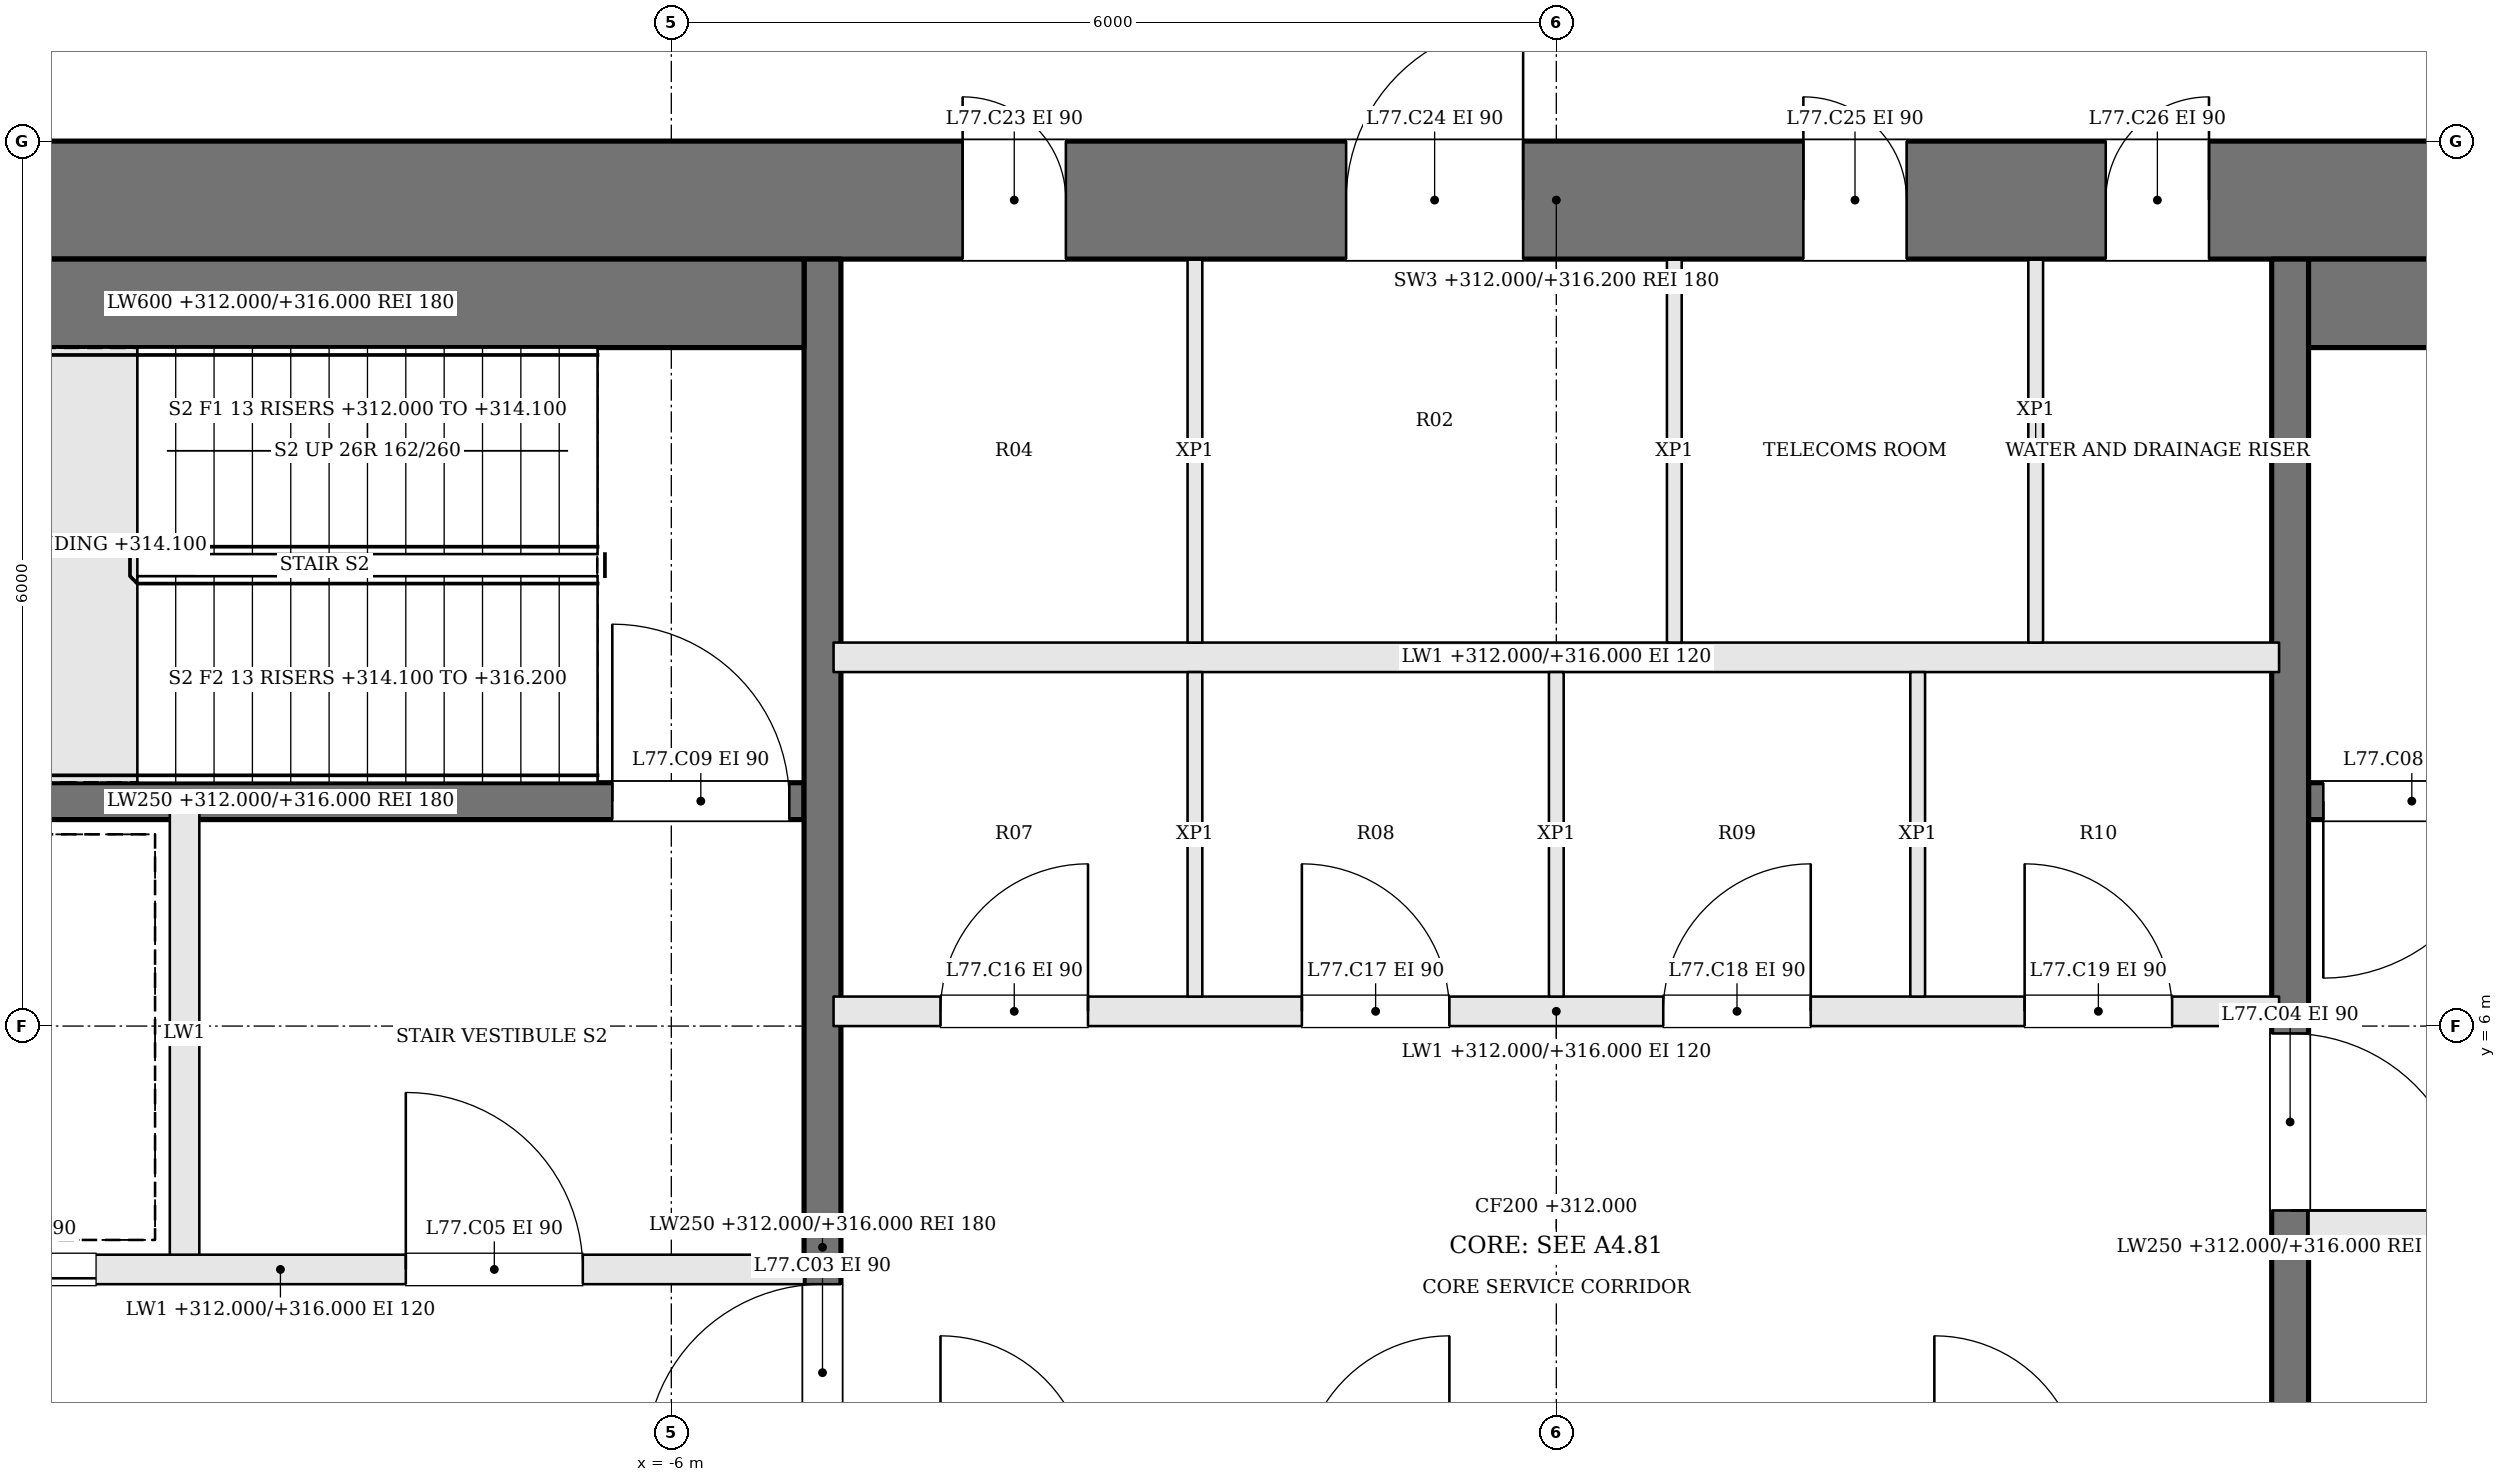
"""IFC4 building model, lengths in metres.
Left out: names, types, materials, properties, quantities, classifications, styles, units other than length and angle.
Written with IfcOpenShell. Run it as: python <this file> out.ifc"""

import sys

from ifc_helpers import new_model, si_unit, direction, frame, frame_2d, origin, place, context, subcontext, project, spatial, rectangle, extrude, element, fill, save


model = new_model("IFC4")
c1 = context("Model", 3, precision=1e-05, world=origin(), true_north=direction((0.0, 1.0)))
c2 = subcontext(c1, "Body", "Model", "MODEL_VIEW")
j1 = project(units=[si_unit("LENGTHUNIT", "METRE"), si_unit("PLANEANGLEUNIT", "RADIAN")], contexts=[c1])
p1 = place(None, origin())
s1 = spatial("IfcSite", under=j1, at=p1, CompositionType="ELEMENT")
p2 = place(p1, origin())
s2 = spatial("IfcBuilding", under=s1, at=p2, CompositionType="ELEMENT")
p3 = place(p2, frame((0.0, 0.0, 312.0)))
s3 = spatial("IfcBuildingStorey", under=s2, at=p3, CompositionType="ELEMENT", Elevation=312.0)
p4 = place(p3, frame((-13.0, 11.6, 0.0), z_axis=(0.0, 0.0, 1.0), x_axis=(1.0, 0.0, 0.0)))
e1 = element("IfcWall", 1, at=p4, inside=s3, PredefinedType="SHEAR", context=c2, shape_type="SweptSolid", body=[
    extrude(rectangle(XDim=26.0, YDim=0.8, at=frame_2d((13.0, 0.0))), origin(), (0.0, 0.0, 1.0), 4.2),
])
p5 = place(p4, frame((8.975, 0.0, 0.0)))
e2 = element("IfcOpeningElement", 2, at=p5, cuts=e1, PredefinedType="OPENING", context=c2, shape_type="SweptSolid", body=[
    extrude(rectangle(XDim=0.7, YDim=2.1, at=frame_2d((0.35, 1.05))), frame((0.0, 0.41, 0.0), z_axis=(0.0, -1.0, 0.0), x_axis=(1.0, 0.0, 0.0)), (0.0, 0.0, 1.0), 0.82),
])
p6 = place(p4, frame((11.575, 0.0, 0.0)))
e3 = element("IfcOpeningElement", 3, at=p6, cuts=e1, PredefinedType="OPENING", context=c2, shape_type="SweptSolid", body=[
    extrude(rectangle(XDim=1.2, YDim=2.1, at=frame_2d((0.6, 1.05))), frame((0.0, 0.41, 0.0), z_axis=(0.0, -1.0, 0.0), x_axis=(1.0, 0.0, 0.0)), (0.0, 0.0, 1.0), 0.82),
])
p7 = place(p4, frame((14.675, 0.0, 0.0)))
e4 = element("IfcOpeningElement", 4, at=p7, cuts=e1, PredefinedType="OPENING", context=c2, shape_type="SweptSolid", body=[
    extrude(rectangle(XDim=0.7, YDim=2.1, at=frame_2d((0.35, 1.05))), frame((0.0, 0.41, 0.0), z_axis=(0.0, -1.0, 0.0), x_axis=(1.0, 0.0, 0.0)), (0.0, 0.0, 1.0), 0.82),
])
p8 = place(p4, frame((16.725, 0.0, 0.0)))
e5 = element("IfcOpeningElement", 5, at=p8, cuts=e1, PredefinedType="OPENING", context=c2, shape_type="SweptSolid", body=[
    extrude(rectangle(XDim=0.7, YDim=2.1, at=frame_2d((0.35, 1.05))), frame((0.0, 0.41, 0.0), z_axis=(0.0, -1.0, 0.0), x_axis=(1.0, 0.0, 0.0)), (0.0, 0.0, 1.0), 0.82),
])
p9 = place(p3, frame((12.2, 7.525, 0.0), z_axis=(0.0, 0.0, 1.0), x_axis=(-1.0, 0.0, 0.0)))
e6 = element("IfcWall", 6, at=p9, inside=s3, PredefinedType="SOLIDWALL", context=c2, shape_type="SweptSolid", body=[
    extrude(rectangle(XDim=7.1, YDim=0.25, at=frame_2d((3.55, 0.0))), origin(), (0.0, 0.0, 1.0), 4.0),
])
p10 = place(p9, frame((5.8, 0.0, 0.0)))
e7 = element("IfcOpeningElement", 7, at=p10, cuts=e6, PredefinedType="OPENING", context=c2, shape_type="SweptSolid", body=[
    extrude(rectangle(XDim=1.2, YDim=2.1, at=frame_2d((0.6, 1.05))), frame((0.0, 0.135, 0.0), z_axis=(0.0, -1.0, 0.0), x_axis=(1.0, 0.0, 0.0)), (0.0, 0.0, 1.0), 0.27),
])
p11 = place(p3, frame((-12.2, 4.35, 0.0), z_axis=(0.0, 0.0, 1.0), x_axis=(1.0, 0.0, 0.0)))
e8 = element("IfcWall", 8, at=p11, inside=s3, PredefinedType="SOLIDWALL", context=c2, shape_type="SweptSolid", body=[
    extrude(rectangle(XDim=7.1, YDim=0.2, at=frame_2d((3.55, 0.0))), origin(), (0.0, 0.0, 1.0), 4.0),
])
p12 = place(p11, frame((4.4, 0.0, 0.0)))
e9 = element("IfcOpeningElement", 9, at=p12, cuts=e8, PredefinedType="OPENING", context=c2, shape_type="SweptSolid", body=[
    extrude(rectangle(XDim=1.2, YDim=2.1, at=frame_2d((0.6, 1.05))), frame((0.0, 0.11, 0.0), z_axis=(0.0, -1.0, 0.0), x_axis=(1.0, 0.0, 0.0)), (0.0, 0.0, 1.0), 0.22),
])
p13 = place(p11, frame((1.1, 0.0, 0.0)))
e10 = element("IfcOpeningElement", 10, at=p13, cuts=e8, PredefinedType="OPENING", context=c2, shape_type="SweptSolid", body=[
    extrude(rectangle(XDim=1.2, YDim=2.1, at=frame_2d((0.6, 1.05))), frame((0.0, 0.11, 0.0), z_axis=(0.0, -1.0, 0.0), x_axis=(1.0, 0.0, 0.0)), (0.0, 0.0, 1.0), 0.22),
])
p14 = place(p3, frame((12.2, 4.65, 0.0), z_axis=(0.0, 0.0, 1.0), x_axis=(-1.0, 0.0, 0.0)))
e11 = element("IfcWall", 11, at=p14, inside=s3, PredefinedType="SOLIDWALL", context=c2, shape_type="SweptSolid", body=[
    extrude(rectangle(XDim=7.1, YDim=0.2, at=frame_2d((3.55, 0.0))), origin(), (0.0, 0.0, 1.0), 4.0),
])
p15 = place(p14, frame((4.4, 0.0, 0.0)))
e12 = element("IfcOpeningElement", 12, at=p15, cuts=e11, PredefinedType="OPENING", context=c2, shape_type="SweptSolid", body=[
    extrude(rectangle(XDim=1.2, YDim=2.1, at=frame_2d((0.6, 1.05))), frame((0.0, 0.11, 0.0), z_axis=(0.0, -1.0, 0.0), x_axis=(1.0, 0.0, 0.0)), (0.0, 0.0, 1.0), 0.22),
])
p16 = place(p14, frame((1.1, 0.0, 0.0)))
e13 = element("IfcOpeningElement", 13, at=p16, cuts=e11, PredefinedType="OPENING", context=c2, shape_type="SweptSolid", body=[
    extrude(rectangle(XDim=1.2, YDim=2.1, at=frame_2d((0.6, 1.05))), frame((0.0, 0.11, 0.0), z_axis=(0.0, -1.0, 0.0), x_axis=(1.0, 0.0, 0.0)), (0.0, 0.0, 1.0), 0.22),
])
p17 = place(p3, frame((-12.2, 7.525, 0.0), z_axis=(0.0, 0.0, 1.0), x_axis=(1.0, 0.0, 0.0)))
e14 = element("IfcWall", 14, at=p17, inside=s3, PredefinedType="SOLIDWALL", context=c2, shape_type="SweptSolid", body=[
    extrude(rectangle(XDim=7.1, YDim=0.25, at=frame_2d((3.55, 0.0))), origin(), (0.0, 0.0, 1.0), 4.0),
])
p18 = place(p17, frame((5.8, 0.0, 0.0)))
e15 = element("IfcOpeningElement", 15, at=p18, cuts=e14, PredefinedType="OPENING", context=c2, shape_type="SweptSolid", body=[
    extrude(rectangle(XDim=1.2, YDim=2.1, at=frame_2d((0.6, 1.05))), frame((0.0, 0.135, 0.0), z_axis=(0.0, -1.0, 0.0), x_axis=(1.0, 0.0, 0.0)), (0.0, 0.0, 1.0), 0.27),
])
p19 = place(p3, frame((-9.3, 4.45, 0.0), z_axis=(0.0, 0.0, 1.0), x_axis=(0.0, 1.0, 0.0)))
e16 = element("IfcWall", 16, at=p19, inside=s3, PredefinedType="SOLIDWALL", context=c2, shape_type="SweptSolid", body=[
    extrude(rectangle(XDim=3.0, YDim=0.2, at=frame_2d((1.5, 0.0))), origin(), (0.0, 0.0, 1.0), 4.0),
])
p20 = place(p3, frame((-4.975, -2.2, 0.0), z_axis=(0.0, 0.0, 1.0), x_axis=(0.0, 1.0, 0.0)))
e17 = element("IfcWall", 17, at=p20, inside=s3, PredefinedType="SOLIDWALL", context=c2, shape_type="SweptSolid", body=[
    extrude(rectangle(XDim=13.4, YDim=0.25, at=frame_2d((6.7, 0.0))), origin(), (0.0, 0.0, 1.0), 4.0),
])
p21 = place(p20, frame((5.25, 0.0, 0.0)))
e18 = element("IfcOpeningElement", 18, at=p21, cuts=e17, PredefinedType="OPENING", context=c2, shape_type="SweptSolid", body=[
    extrude(rectangle(XDim=1.2, YDim=2.1, at=frame_2d((0.6, 1.05))), frame((0.0, 0.135, 0.0), z_axis=(0.0, -1.0, 0.0), x_axis=(1.0, 0.0, 0.0)), (0.0, 0.0, 1.0), 0.27),
])
p22 = place(p3, frame((4.975, 11.2, 0.0), z_axis=(0.0, 0.0, 1.0), x_axis=(0.0, -1.0, 0.0)))
e19 = element("IfcWall", 19, at=p22, inside=s3, PredefinedType="SOLIDWALL", context=c2, shape_type="SweptSolid", body=[
    extrude(rectangle(XDim=13.4, YDim=0.25, at=frame_2d((6.7, 0.0))), origin(), (0.0, 0.0, 1.0), 4.0),
])
p23 = place(p22, frame((5.25, 0.0, 0.0)))
e20 = element("IfcOpeningElement", 20, at=p23, cuts=e19, PredefinedType="OPENING", context=c2, shape_type="SweptSolid", body=[
    extrude(rectangle(XDim=1.2, YDim=2.1, at=frame_2d((0.6, 1.05))), frame((0.0, 0.135, 0.0), z_axis=(0.0, -1.0, 0.0), x_axis=(1.0, 0.0, 0.0)), (0.0, 0.0, 1.0), 0.27),
])
for number, where, z_axis, x_axis in (
    (21, (-12.2, 10.9, 0.0), (0.0, 0.0, 1.0), (1.0, 0.0, 0.0)),
    (22, (12.2, 10.9, 0.0), (0.0, 0.0, 1.0), (-1.0, 0.0, 0.0)),
):
    element("IfcWall", number, at=place(p3, frame(where, z_axis=z_axis, x_axis=x_axis)), inside=s3, PredefinedType="SOLIDWALL", context=c2, shape_type="SweptSolid", body=[
        extrude(rectangle(XDim=7.1, YDim=0.6, at=frame_2d((3.55, 0.0))), origin(), (0.0, 0.0, 1.0), 4.0),
    ])
p24 = place(p3, frame((-4.9, 6.1, 0.0), z_axis=(0.0, 0.0, 1.0), x_axis=(1.0, 0.0, 0.0)))
e23 = element("IfcWall", 23, at=p24, inside=s3, PredefinedType="SOLIDWALL", context=c2, shape_type="SweptSolid", body=[
    extrude(rectangle(XDim=9.8, YDim=0.2, at=frame_2d((4.9, 0.0))), origin(), (0.0, 0.0, 1.0), 4.0),
])
p25 = place(p24, frame((0.725, 0.0, 0.0)))
e24 = element("IfcOpeningElement", 24, at=p25, cuts=e23, PredefinedType="OPENING", context=c2, shape_type="SweptSolid", body=[
    extrude(rectangle(XDim=1.0, YDim=2.1, at=frame_2d((0.5, 1.05))), frame((0.0, 0.11, 0.0), z_axis=(0.0, -1.0, 0.0), x_axis=(1.0, 0.0, 0.0)), (0.0, 0.0, 1.0), 0.22),
])
p26 = place(p24, frame((3.175, 0.0, 0.0)))
e25 = element("IfcOpeningElement", 25, at=p26, cuts=e23, PredefinedType="OPENING", context=c2, shape_type="SweptSolid", body=[
    extrude(rectangle(XDim=1.0, YDim=2.1, at=frame_2d((0.5, 1.05))), frame((0.0, 0.11, 0.0), z_axis=(0.0, -1.0, 0.0), x_axis=(1.0, 0.0, 0.0)), (0.0, 0.0, 1.0), 0.22),
])
p27 = place(p24, frame((5.625, 0.0, 0.0)))
e26 = element("IfcOpeningElement", 26, at=p27, cuts=e23, PredefinedType="OPENING", context=c2, shape_type="SweptSolid", body=[
    extrude(rectangle(XDim=1.0, YDim=2.1, at=frame_2d((0.5, 1.05))), frame((0.0, 0.11, 0.0), z_axis=(0.0, -1.0, 0.0), x_axis=(1.0, 0.0, 0.0)), (0.0, 0.0, 1.0), 0.22),
])
p28 = place(p24, frame((8.075, 0.0, 0.0)))
e27 = element("IfcOpeningElement", 27, at=p28, cuts=e23, PredefinedType="OPENING", context=c2, shape_type="SweptSolid", body=[
    extrude(rectangle(XDim=1.0, YDim=2.1, at=frame_2d((0.5, 1.05))), frame((0.0, 0.11, 0.0), z_axis=(0.0, -1.0, 0.0), x_axis=(1.0, 0.0, 0.0)), (0.0, 0.0, 1.0), 0.22),
])
p29 = place(p3, frame((-4.9, 8.5, 0.0), z_axis=(0.0, 0.0, 1.0), x_axis=(1.0, 0.0, 0.0)))
e28 = element("IfcWall", 28, at=p29, inside=s3, PredefinedType="SOLIDWALL", context=c2, shape_type="SweptSolid", body=[
    extrude(rectangle(XDim=9.8, YDim=0.2, at=frame_2d((4.9, 0.0))), origin(), (0.0, 0.0, 1.0), 4.0),
])
for number, where, z_axis, x_axis in (
    (29, (-2.45, 6.2, 0.0), (0.0, 0.0, 1.0), (0.0, 1.0, 0.0)),
    (30, (0.0, 6.2, 0.0), (0.0, 0.0, 1.0), (0.0, 1.0, 0.0)),
    (31, (2.45, 6.2, 0.0), (0.0, 0.0, 1.0), (0.0, 1.0, 0.0)),
):
    element("IfcWall", number, at=place(p3, frame(where, z_axis=z_axis, x_axis=x_axis)), inside=s3, PredefinedType="PARTITIONING", context=c2, shape_type="SweptSolid", body=[
        extrude(rectangle(XDim=2.2, YDim=0.1, at=frame_2d((1.1, 0.0))), origin(), (0.0, 0.0, 1.0), 4.0),
    ])
for number, where, z_axis, x_axis in (
    (32, (-2.45, 8.6, 0.0), (0.0, 0.0, 1.0), (0.0, 1.0, 0.0)),
    (33, (0.8, 8.6, 0.0), (0.0, 0.0, 1.0), (0.0, 1.0, 0.0)),
    (34, (3.25, 8.6, 0.0), (0.0, 0.0, 1.0), (0.0, 1.0, 0.0)),
):
    element("IfcWall", number, at=place(p3, frame(where, z_axis=z_axis, x_axis=x_axis)), inside=s3, PredefinedType="PARTITIONING", context=c2, shape_type="SweptSolid", body=[
        extrude(rectangle(XDim=2.6, YDim=0.1, at=frame_2d((1.3, 0.0))), origin(), (0.0, 0.0, 1.0), 4.0),
    ])
p30 = place(p21, origin())
e35 = element("IfcDoor", 35, at=p30, inside=s3, OperationType="SINGLE_SWING_LEFT", PredefinedType="DOOR", context=c2, shape_type="SweptSolid", body=[
    extrude(rectangle(XDim=1.2, YDim=2.1, at=frame_2d((0.6, 1.05))), frame((0.0, 0.025, 0.0), z_axis=(0.0, -1.0, 0.0), x_axis=(1.0, 0.0, 0.0)), (0.0, 0.0, 1.0), 0.05),
])
fill(e18, e35)
p31 = place(p23, origin())
e36 = element("IfcDoor", 36, at=p31, inside=s3, OperationType="SINGLE_SWING_RIGHT", PredefinedType="DOOR", context=c2, shape_type="SweptSolid", body=[
    extrude(rectangle(XDim=1.2, YDim=2.1, at=frame_2d((0.6, 1.05))), frame((0.0, 0.025, 0.0), z_axis=(0.0, -1.0, 0.0), x_axis=(1.0, 0.0, 0.0)), (0.0, 0.0, 1.0), 0.05),
])
fill(e20, e36)
p32 = place(p12, origin())
e37 = element("IfcDoor", 37, at=p32, inside=s3, OperationType="SINGLE_SWING_LEFT", PredefinedType="DOOR", context=c2, shape_type="SweptSolid", body=[
    extrude(rectangle(XDim=1.2, YDim=2.1, at=frame_2d((0.6, 1.05))), frame((0.0, 0.025, 0.0), z_axis=(0.0, -1.0, 0.0), x_axis=(1.0, 0.0, 0.0)), (0.0, 0.0, 1.0), 0.05),
])
fill(e9, e37)
p33 = place(p10, origin())
e38 = element("IfcDoor", 38, at=p33, inside=s3, OperationType="SINGLE_SWING_RIGHT", PredefinedType="DOOR", context=c2, shape_type="SweptSolid", body=[
    extrude(rectangle(XDim=1.2, YDim=2.1, at=frame_2d((0.6, 1.05))), frame((0.0, 0.025, 0.0), z_axis=(0.0, -1.0, 0.0), x_axis=(1.0, 0.0, 0.0)), (0.0, 0.0, 1.0), 0.05),
])
fill(e7, e38)
p34 = place(p18, origin())
e39 = element("IfcDoor", 39, at=p34, inside=s3, OperationType="SINGLE_SWING_LEFT", PredefinedType="DOOR", context=c2, shape_type="SweptSolid", body=[
    extrude(rectangle(XDim=1.2, YDim=2.1, at=frame_2d((0.6, 1.05))), frame((0.0, 0.025, 0.0), z_axis=(0.0, -1.0, 0.0), x_axis=(1.0, 0.0, 0.0)), (0.0, 0.0, 1.0), 0.05),
])
fill(e15, e39)
p35 = place(p13, origin())
e40 = element("IfcDoor", 40, at=p35, inside=s3, OperationType="SLIDING_TO_RIGHT", PredefinedType="DOOR", context=c2, shape_type="SweptSolid", body=[
    extrude(rectangle(XDim=1.2, YDim=2.1, at=frame_2d((0.6, 1.05))), frame((0.0, 0.025, 0.0), z_axis=(0.0, -1.0, 0.0), x_axis=(1.0, 0.0, 0.0)), (0.0, 0.0, 1.0), 0.05),
])
fill(e10, e40)
p36 = place(p25, origin())
e41 = element("IfcDoor", 41, at=p36, inside=s3, OperationType="SINGLE_SWING_RIGHT", PredefinedType="DOOR", context=c2, shape_type="SweptSolid", body=[
    extrude(rectangle(XDim=1.0, YDim=2.1, at=frame_2d((0.5, 1.05))), frame((0.0, 0.025, 0.0), z_axis=(0.0, -1.0, 0.0), x_axis=(1.0, 0.0, 0.0)), (0.0, 0.0, 1.0), 0.05),
])
fill(e24, e41)
p37 = place(p26, origin())
e42 = element("IfcDoor", 42, at=p37, inside=s3, OperationType="SINGLE_SWING_LEFT", PredefinedType="DOOR", context=c2, shape_type="SweptSolid", body=[
    extrude(rectangle(XDim=1.0, YDim=2.1, at=frame_2d((0.5, 1.05))), frame((0.0, 0.025, 0.0), z_axis=(0.0, -1.0, 0.0), x_axis=(1.0, 0.0, 0.0)), (0.0, 0.0, 1.0), 0.05),
])
fill(e25, e42)
p38 = place(p27, origin())
e43 = element("IfcDoor", 43, at=p38, inside=s3, OperationType="SINGLE_SWING_RIGHT", PredefinedType="DOOR", context=c2, shape_type="SweptSolid", body=[
    extrude(rectangle(XDim=1.0, YDim=2.1, at=frame_2d((0.5, 1.05))), frame((0.0, 0.025, 0.0), z_axis=(0.0, -1.0, 0.0), x_axis=(1.0, 0.0, 0.0)), (0.0, 0.0, 1.0), 0.05),
])
fill(e26, e43)
p39 = place(p28, origin())
e44 = element("IfcDoor", 44, at=p39, inside=s3, OperationType="SINGLE_SWING_LEFT", PredefinedType="DOOR", context=c2, shape_type="SweptSolid", body=[
    extrude(rectangle(XDim=1.0, YDim=2.1, at=frame_2d((0.5, 1.05))), frame((0.0, 0.025, 0.0), z_axis=(0.0, -1.0, 0.0), x_axis=(1.0, 0.0, 0.0)), (0.0, 0.0, 1.0), 0.05),
])
fill(e27, e44)
p40 = place(p5, origin())
e45 = element("IfcDoor", 45, at=p40, inside=s3, OperationType="SINGLE_SWING_LEFT", PredefinedType="DOOR", context=c2, shape_type="SweptSolid", body=[
    extrude(rectangle(XDim=0.7, YDim=2.1, at=frame_2d((0.35, 1.05))), frame((0.0, 0.025, 0.0), z_axis=(0.0, -1.0, 0.0), x_axis=(1.0, 0.0, 0.0)), (0.0, 0.0, 1.0), 0.05),
])
fill(e2, e45)
p41 = place(p6, origin())
e46 = element("IfcDoor", 46, at=p41, inside=s3, OperationType="SINGLE_SWING_RIGHT", PredefinedType="DOOR", context=c2, shape_type="SweptSolid", body=[
    extrude(rectangle(XDim=1.2, YDim=2.1, at=frame_2d((0.6, 1.05))), frame((0.0, 0.025, 0.0), z_axis=(0.0, -1.0, 0.0), x_axis=(1.0, 0.0, 0.0)), (0.0, 0.0, 1.0), 0.05),
])
fill(e3, e46)
p42 = place(p7, origin())
e47 = element("IfcDoor", 47, at=p42, inside=s3, OperationType="SINGLE_SWING_LEFT", PredefinedType="DOOR", context=c2, shape_type="SweptSolid", body=[
    extrude(rectangle(XDim=0.7, YDim=2.1, at=frame_2d((0.35, 1.05))), frame((0.0, 0.025, 0.0), z_axis=(0.0, -1.0, 0.0), x_axis=(1.0, 0.0, 0.0)), (0.0, 0.0, 1.0), 0.05),
])
fill(e4, e47)
p43 = place(p8, origin())
e48 = element("IfcDoor", 48, at=p43, inside=s3, OperationType="SINGLE_SWING_RIGHT", PredefinedType="DOOR", context=c2, shape_type="SweptSolid", body=[
    extrude(rectangle(XDim=0.7, YDim=2.1, at=frame_2d((0.35, 1.05))), frame((0.0, 0.025, 0.0), z_axis=(0.0, -1.0, 0.0), x_axis=(1.0, 0.0, 0.0)), (0.0, 0.0, 1.0), 0.05),
])
fill(e5, e48)
save(model, sys.argv[1])
